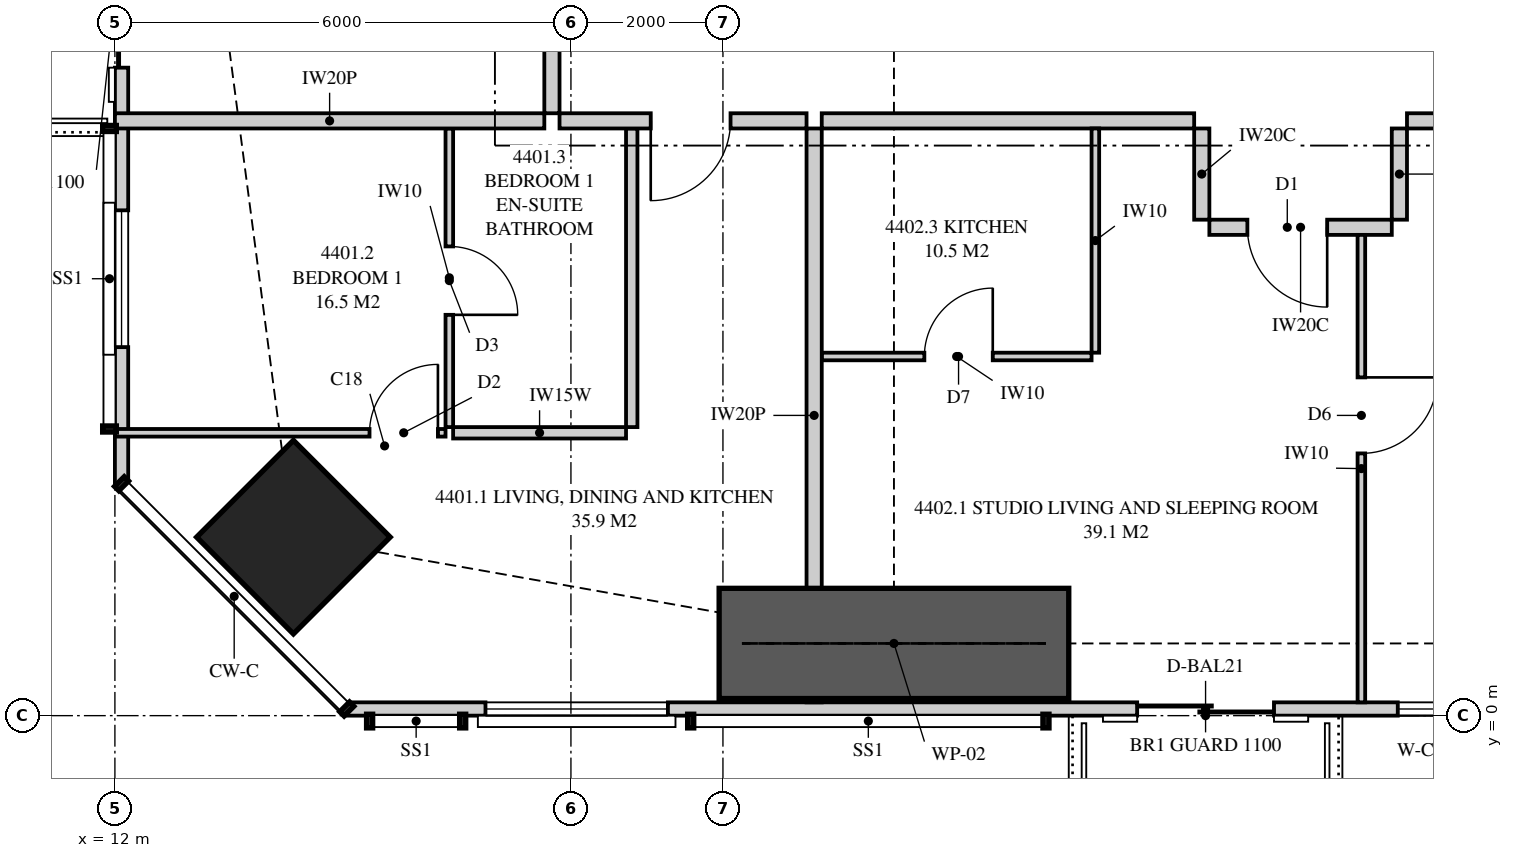
"""IFC4 building model, lengths in metres.
Left out: names, types, materials, properties, quantities, classifications, styles, units other than length and angle.
Written with IfcOpenShell. Run it as: python <this file> out.ifc"""

import sys

from ifc_helpers import new_model, si_unit, direction, frame, frame_2d, origin, origin_2d, place, context, subcontext, project, spatial, polyline, rectangle, outline, extrude, element, fill, save


model = new_model("IFC4")
c1 = context("Model", 3, precision=1e-05, world=origin(), true_north=direction((0.0, 1.0)))
c2 = subcontext(c1, "Body", "Model", "MODEL_VIEW")
j1 = project(units=[si_unit("LENGTHUNIT", "METRE"), si_unit("PLANEANGLEUNIT", "RADIAN")], contexts=[c1])
p1 = place(None, origin())
s1 = spatial("IfcSite", under=j1, at=p1, CompositionType="ELEMENT")
p2 = place(p1, origin())
s2 = spatial("IfcBuilding", under=s1, at=p2, CompositionType="ELEMENT")
p3 = place(p2, frame((0.0, 0.0, 164.4)))
s3 = spatial("IfcBuildingStorey", under=s2, at=p3, CompositionType="ELEMENT", Elevation=164.4)
p4 = place(p3, frame((14.348, 2.348, 0.0), z_axis=(0.0, 0.0, 1.0), x_axis=(0.707106781187, 0.707106781187, 0.0)))
e1 = element("IfcColumn", 1, at=p4, inside=s3, PredefinedType="COLUMN", context=c2, shape_type="SweptSolid", body=[
    extrude(rectangle(XDim=1.8, YDim=1.8, at=origin_2d()), origin(), (0.0, 0.0, 1.0), 3.35),
])
p5 = place(p3, frame((15.051, 0.087, 0.0), z_axis=(0.0, 0.0, 1.0), x_axis=(1.0, 0.0, 0.0)))
e2 = element("IfcWall", 2, at=p5, inside=s3, PredefinedType="SOLIDWALL", context=c2, shape_type="SweptSolid", body=[
    extrude(outline(polyline([(0.0, 0.0), (34.897, 0.0), (34.897, 3.11), (27.91, 3.11), (27.91, 2.15), (27.836, 2.15), (27.836, 3.11), (27.699, 3.11), (27.699, 2.15), (7.199, 2.15), (7.199, 3.11), (7.062, 3.11), (7.062, 2.15), (6.987, 2.15), (6.987, 3.11), (0.0, 3.11), (0.0, 0.0)])), frame((0.0, 0.087, 0.0), z_axis=(0.0, -1.0, 0.0), x_axis=(1.0, 0.0, 0.0)), (0.0, 0.0, 1.0), 0.175),
])
p6 = place(p5, frame((1.824, 0.0, 0.4)))
e3 = element("IfcOpeningElement", 3, at=p6, cuts=e2, PredefinedType="OPENING", context=c2, shape_type="SweptSolid", body=[
    extrude(rectangle(XDim=2.4, YDim=1.7, at=frame_2d((1.2, 0.85))), frame((0.0, 0.097, 0.0), z_axis=(0.0, -1.0, 0.0), x_axis=(1.0, 0.0, 0.0)), (0.0, 0.0, 1.0), 0.195),
])
p7 = place(p5, frame((10.399, 0.0, 0.0)))
e4 = element("IfcOpeningElement", 4, at=p7, cuts=e2, PredefinedType="OPENING", context=c2, shape_type="SweptSolid", body=[
    extrude(rectangle(XDim=1.8, YDim=2.1, at=frame_2d((0.9, 1.05))), frame((0.0, 0.097, 0.0), z_axis=(0.0, -1.0, 0.0), x_axis=(1.0, 0.0, 0.0)), (0.0, 0.0, 1.0), 0.195),
])
p8 = place(p5, frame((13.827, 0.0, 0.4)))
e5 = element("IfcOpeningElement", 5, at=p8, cuts=e2, PredefinedType="OPENING", context=c2, shape_type="SweptSolid", body=[
    extrude(rectangle(XDim=1.2, YDim=1.7, at=frame_2d((0.6, 0.85))), frame((0.0, 0.097, 0.0), z_axis=(0.0, -1.0, 0.0), x_axis=(1.0, 0.0, 0.0)), (0.0, 0.0, 1.0), 0.195),
])
p9 = place(p5, frame((22.799, 0.0, 0.0)))
e6 = element("IfcOpeningElement", 6, at=p9, cuts=e2, PredefinedType="OPENING", context=c2, shape_type="SweptSolid", body=[
    extrude(rectangle(XDim=1.8, YDim=2.1, at=frame_2d((0.9, 1.05))), frame((0.0, 0.097, 0.0), z_axis=(0.0, -1.0, 0.0), x_axis=(1.0, 0.0, 0.0)), (0.0, 0.0, 1.0), 0.195),
])
p10 = place(p5, frame((19.849, 0.0, 0.4)))
e7 = element("IfcOpeningElement", 7, at=p10, cuts=e2, PredefinedType="OPENING", context=c2, shape_type="SweptSolid", body=[
    extrude(rectangle(XDim=2.4, YDim=1.7, at=frame_2d((1.2, 0.85))), frame((0.0, 0.097, 0.0), z_axis=(0.0, -1.0, 0.0), x_axis=(1.0, 0.0, 0.0)), (0.0, 0.0, 1.0), 0.195),
])
p11 = place(p5, frame((30.108, 0.0, 0.4)))
e8 = element("IfcOpeningElement", 8, at=p11, cuts=e2, PredefinedType="OPENING", context=c2, shape_type="SweptSolid", body=[
    extrude(rectangle(XDim=2.4, YDim=1.7, at=frame_2d((1.2, 0.85))), frame((0.0, 0.097, 0.0), z_axis=(0.0, -1.0, 0.0), x_axis=(1.0, 0.0, 0.0)), (0.0, 0.0, 1.0), 0.195),
])
p12 = place(p3, frame((12.087, 32.949, 0.0), z_axis=(0.0, 0.0, 1.0), x_axis=(0.0, -1.0, 0.0)))
e9 = element("IfcWall", 9, at=p12, inside=s3, PredefinedType="SOLIDWALL", context=c2, shape_type="SweptSolid", body=[
    extrude(outline(polyline([(0.0, 0.0), (29.897, 0.0), (29.897, 3.11), (20.191, 3.11), (20.191, 2.15), (20.051, 2.15), (20.051, 3.11), (19.949, 3.11), (19.949, 2.15), (7.949, 2.15), (7.949, 3.11), (7.823, 3.11), (7.823, 2.15), (7.73, 2.15), (7.73, 3.11), (0.0, 3.11), (0.0, 0.0)])), frame((0.0, 0.087, 0.0), z_axis=(0.0, -1.0, 0.0), x_axis=(1.0, 0.0, 0.0)), (0.0, 0.0, 1.0), 0.175),
])
p13 = place(p12, frame((1.297, 0.0, 0.4)))
e10 = element("IfcOpeningElement", 10, at=p13, cuts=e9, PredefinedType="OPENING", context=c2, shape_type="SweptSolid", body=[
    extrude(rectangle(XDim=1.8, YDim=1.7, at=frame_2d((0.9, 0.85))), frame((0.0, 0.097, 0.0), z_axis=(0.0, -1.0, 0.0), x_axis=(1.0, 0.0, 0.0)), (0.0, 0.0, 1.0), 0.195),
])
p14 = place(p12, frame((4.349, 0.0, 0.4)))
e11 = element("IfcOpeningElement", 11, at=p14, cuts=e9, PredefinedType="OPENING", context=c2, shape_type="SweptSolid", body=[
    extrude(rectangle(XDim=1.2, YDim=1.7, at=frame_2d((0.6, 0.85))), frame((0.0, 0.097, 0.0), z_axis=(0.0, -1.0, 0.0), x_axis=(1.0, 0.0, 0.0)), (0.0, 0.0, 1.0), 0.195),
])
p15 = place(p12, frame((11.024, 0.0, 0.4)))
e12 = element("IfcOpeningElement", 12, at=p15, cuts=e9, PredefinedType="OPENING", context=c2, shape_type="SweptSolid", body=[
    extrude(rectangle(XDim=1.8, YDim=1.7, at=frame_2d((0.9, 0.85))), frame((0.0, 0.097, 0.0), z_axis=(0.0, -1.0, 0.0), x_axis=(1.0, 0.0, 0.0)), (0.0, 0.0, 1.0), 0.195),
])
p16 = place(p12, frame((15.044, 0.0, 0.4)))
e13 = element("IfcOpeningElement", 13, at=p16, cuts=e9, PredefinedType="OPENING", context=c2, shape_type="SweptSolid", body=[
    extrude(rectangle(XDim=2.4, YDim=1.7, at=frame_2d((1.2, 0.85))), frame((0.0, 0.097, 0.0), z_axis=(0.0, -1.0, 0.0), x_axis=(1.0, 0.0, 0.0)), (0.0, 0.0, 1.0), 0.195),
])
p17 = place(p12, frame((22.624, 0.0, 0.0)))
e14 = element("IfcOpeningElement", 14, at=p17, cuts=e9, PredefinedType="OPENING", context=c2, shape_type="SweptSolid", body=[
    extrude(rectangle(XDim=1.8, YDim=2.1, at=frame_2d((0.9, 1.05))), frame((0.0, 0.097, 0.0), z_axis=(0.0, -1.0, 0.0), x_axis=(1.0, 0.0, 0.0)), (0.0, 0.0, 1.0), 0.195),
])
p18 = place(p12, frame((26.301, 0.0, 0.4)))
e15 = element("IfcOpeningElement", 15, at=p18, cuts=e9, PredefinedType="OPENING", context=c2, shape_type="SweptSolid", body=[
    extrude(rectangle(XDim=1.8, YDim=1.7, at=frame_2d((0.9, 0.85))), frame((0.0, 0.097, 0.0), z_axis=(0.0, -1.0, 0.0), x_axis=(1.0, 0.0, 0.0)), (0.0, 0.0, 1.0), 0.195),
])
p19 = place(p3, frame((21.2, 0.175, 0.0), z_axis=(0.0, 0.0, 1.0), x_axis=(0.0, 1.0, 0.0)))
e16 = element("IfcWall", 16, at=p19, inside=s3, PredefinedType="PARTITIONING", context=c2, shape_type="SweptSolid", body=[
    extrude(outline(polyline([(0.037, 3.11), (0.0, 3.11), (0.0, 0.0), (0.529, 0.0), (0.529, 0.667), (1.021, 0.667), (1.021, 0.0), (7.55, 0.0), (7.55, 3.11), (1.885, 3.11), (1.885, 2.15), (1.021, 2.15), (1.021, 1.483), (0.529, 1.483), (0.529, 2.15), (0.037, 2.15), (0.037, 3.11)])), frame((0.0, 0.1, 0.0), z_axis=(0.0, -1.0, 0.0), x_axis=(1.0, 0.0, 0.0)), (0.0, 0.0, 1.0), 0.2),
])
p20 = place(p3, frame((17.85, 7.825, 0.0), z_axis=(0.0, 0.0, 1.0), x_axis=(1.0, 0.0, 0.0)))
e17 = element("IfcWall", 17, at=p20, inside=s3, PredefinedType="PARTITIONING", context=c2, shape_type="SweptSolid", body=[
    extrude(rectangle(XDim=3.25, YDim=0.2, at=frame_2d((1.625, 0.0))), origin(), (0.0, 0.0, 1.0), 3.11),
])
p21 = place(p20, frame((1.2, 0.0, 0.0)))
e18 = element("IfcOpeningElement", 18, at=p21, cuts=e17, PredefinedType="OPENING", context=c2, shape_type="SweptSolid", body=[
    extrude(rectangle(XDim=1.05, YDim=2.2, at=frame_2d((0.525, 1.1))), frame((0.0, 0.11, 0.0), z_axis=(0.0, -1.0, 0.0), x_axis=(1.0, 0.0, 0.0)), (0.0, 0.0, 1.0), 0.22),
])
p22 = place(p3, frame((16.4, 3.796, 0.0), z_axis=(0.0, 0.0, 1.0), x_axis=(0.0, 1.0, 0.0)))
e19 = element("IfcWall", 19, at=p22, inside=s3, PredefinedType="PARTITIONING", context=c2, shape_type="SweptSolid", body=[
    extrude(rectangle(XDim=3.929, YDim=0.1, at=frame_2d((1.964, 0.0))), origin(), (0.0, 0.0, 1.0), 3.11),
])
p23 = place(p22, frame((1.477, 0.0, 0.0)))
e20 = element("IfcOpeningElement", 20, at=p23, cuts=e19, PredefinedType="OPENING", context=c2, shape_type="SweptSolid", body=[
    extrude(rectangle(XDim=0.9, YDim=2.1, at=frame_2d((0.45, 1.05))), frame((0.0, 0.06, 0.0), z_axis=(0.0, -1.0, 0.0), x_axis=(1.0, 0.0, 0.0)), (0.0, 0.0, 1.0), 0.12),
])
p24 = place(p3, frame((16.35, 3.721, 0.0), z_axis=(0.0, 0.0, 1.0), x_axis=(-1.0, 0.0, 0.0)))
e21 = element("IfcWall", 21, at=p24, inside=s3, PredefinedType="PARTITIONING", context=c2, shape_type="SweptSolid", body=[
    extrude(outline(polyline([(0.0, 0.0), (4.35, 0.0), (4.35, 3.11), (3.049, 3.11), (3.049, 2.15), (1.314, 2.15), (1.314, 3.11), (0.0, 3.11), (0.0, 0.0)])), frame((0.0, 0.05, 0.0), z_axis=(0.0, -1.0, 0.0), x_axis=(1.0, 0.0, 0.0)), (0.0, 0.0, 1.0), 0.1),
])
p25 = place(p24, frame((0.1, 0.0, 0.0)))
e22 = element("IfcOpeningElement", 22, at=p25, cuts=e21, PredefinedType="OPENING", context=c2, shape_type="SweptSolid", body=[
    extrude(rectangle(XDim=0.9, YDim=2.1, at=frame_2d((0.45, 1.05))), frame((0.0, 0.06, 0.0), z_axis=(0.0, -1.0, 0.0), x_axis=(1.0, 0.0, 0.0)), (0.0, 0.0, 1.0), 0.12),
])
p26 = place(p3, frame((18.725, 3.721, 0.0), z_axis=(0.0, 0.0, 1.0), x_axis=(-1.0, 0.0, 0.0)))
e23 = element("IfcWall", 23, at=p26, inside=s3, PredefinedType="PLUMBINGWALL", context=c2, shape_type="SweptSolid", body=[
    extrude(rectangle(XDim=2.275, YDim=0.15, at=frame_2d((1.138, 0.0))), origin(), (0.0, 0.0, 1.0), 3.11),
])
p27 = place(p3, frame((18.8, 3.796, 0.0), z_axis=(0.0, 0.0, 1.0), x_axis=(0.0, 1.0, 0.0)))
e24 = element("IfcWall", 24, at=p27, inside=s3, PredefinedType="PLUMBINGWALL", context=c2, shape_type="SweptSolid", body=[
    extrude(rectangle(XDim=3.929, YDim=0.15, at=frame_2d((1.964, 0.0))), origin(), (0.0, 0.0, 1.0), 3.11),
])
p28 = place(p3, frame((21.3, 7.825, 0.0), z_axis=(0.0, 0.0, 1.0), x_axis=(1.0, 0.0, 0.0)))
e25 = element("IfcWall", 25, at=p28, inside=s3, PredefinedType="PARTITIONING", context=c2, shape_type="SweptSolid", body=[
    extrude(outline(polyline([(0.0, 0.0), (4.9, 0.0), (4.9, 3.11), (1.287, 3.11), (1.287, 2.541), (0.613, 2.541), (0.613, 3.11), (0.0, 3.11), (0.0, 0.0)])), frame((0.0, 0.1, 0.0), z_axis=(0.0, -1.0, 0.0), x_axis=(1.0, 0.0, 0.0)), (0.0, 0.0, 1.0), 0.2),
])
p29 = place(p3, frame((21.3, 4.725, 0.0), z_axis=(0.0, 0.0, 1.0), x_axis=(1.0, 0.0, 0.0)))
e26 = element("IfcWall", 26, at=p29, inside=s3, PredefinedType="PARTITIONING", context=c2, shape_type="SweptSolid", body=[
    extrude(outline(polyline([(0.0, 0.0), (3.55, 0.0), (3.55, 3.11), (1.237, 3.11), (1.237, 2.541), (0.663, 2.541), (0.663, 3.11), (0.0, 3.11), (0.0, 0.0)])), frame((0.0, 0.05, 0.0), z_axis=(0.0, -1.0, 0.0), x_axis=(1.0, 0.0, 0.0)), (0.0, 0.0, 1.0), 0.1),
])
p30 = place(p29, frame((1.35, 0.0, 0.0)))
e27 = element("IfcOpeningElement", 27, at=p30, cuts=e26, PredefinedType="OPENING", context=c2, shape_type="SweptSolid", body=[
    extrude(rectangle(XDim=0.9, YDim=2.1, at=frame_2d((0.45, 1.05))), frame((0.0, 0.06, 0.0), z_axis=(0.0, -1.0, 0.0), x_axis=(1.0, 0.0, 0.0)), (0.0, 0.0, 1.0), 0.12),
])
p31 = place(p3, frame((24.9, 4.775, 0.0), z_axis=(0.0, 0.0, 1.0), x_axis=(0.0, 1.0, 0.0)))
e28 = element("IfcWall", 28, at=p31, inside=s3, PredefinedType="PARTITIONING", context=c2, shape_type="SweptSolid", body=[
    extrude(rectangle(XDim=2.95, YDim=0.1, at=frame_2d((1.475, 0.0))), origin(), (0.0, 0.0, 1.0), 3.11),
])
p32 = place(p3, frame((28.4, 0.175, 0.0), z_axis=(0.0, 0.0, 1.0), x_axis=(0.0, 1.0, 0.0)))
e29 = element("IfcWall", 29, at=p32, inside=s3, PredefinedType="PARTITIONING", context=c2, shape_type="SweptSolid", body=[
    extrude(outline(polyline([(0.0, 0.0), (6.15, 0.0), (6.15, 3.11), (1.635, 3.11), (1.635, 2.15), (0.0, 2.15), (0.0, 3.11), (0.0, 0.0)])), frame((0.0, 0.05, 0.0), z_axis=(0.0, -1.0, 0.0), x_axis=(1.0, 0.0, 0.0)), (0.0, 0.0, 1.0), 0.1),
])
p33 = place(p32, frame((3.275, 0.0, 0.0)))
e30 = element("IfcOpeningElement", 30, at=p33, cuts=e29, PredefinedType="OPENING", context=c2, shape_type="SweptSolid", body=[
    extrude(rectangle(XDim=1.0, YDim=2.1, at=frame_2d((0.5, 1.05))), frame((0.0, 0.06, 0.0), z_axis=(0.0, -1.0, 0.0), x_axis=(1.0, 0.0, 0.0)), (0.0, 0.0, 1.0), 0.12),
])
p34 = place(p3, frame((12.0, 7.825, 0.0), z_axis=(0.0, 0.0, 1.0), x_axis=(1.0, 0.0, 0.0)))
e31 = element("IfcWall", 31, at=p34, inside=s3, PredefinedType="PARTITIONING", context=c2, shape_type="SweptSolid", body=[
    extrude(outline(polyline([(0.0, 0.0), (5.65, 0.0), (5.65, 3.11), (2.547, 3.11), (2.547, 2.15), (0.712, 2.15), (0.712, 3.11), (0.0, 3.11), (0.0, 0.0)])), frame((0.0, 0.1, 0.0), z_axis=(0.0, -1.0, 0.0), x_axis=(1.0, 0.0, 0.0)), (0.0, 0.0, 1.0), 0.2),
])
p35 = place(p3, frame((17.75, 7.925, 0.0), z_axis=(0.0, 0.0, 1.0), x_axis=(0.0, 1.0, 0.0)))
e32 = element("IfcWall", 32, at=p35, inside=s3, PredefinedType="PARTITIONING", context=c2, shape_type="SweptSolid", body=[
    extrude(outline(polyline([(0.0, 0.0), (14.875, 0.0), (14.875, 3.11), (5.412, 3.11), (5.412, 2.541), (4.738, 2.541), (4.738, 3.11), (0.0, 3.11), (0.0, 0.0)])), frame((0.0, 0.1, 0.0), z_axis=(0.0, -1.0, 0.0), x_axis=(1.0, 0.0, 0.0)), (0.0, 0.0, 1.0), 0.2),
])
p36 = place(p35, frame((6.938, 0.0, 0.0)))
e33 = element("IfcOpeningElement", 33, at=p36, cuts=e32, PredefinedType="OPENING", context=c2, shape_type="SweptSolid", body=[
    extrude(rectangle(XDim=1.05, YDim=2.2, at=frame_2d((0.525, 1.1))), frame((0.0, 0.11, 0.0), z_axis=(0.0, -1.0, 0.0), x_axis=(1.0, 0.0, 0.0)), (0.0, 0.0, 1.0), 0.22),
])
p37 = place(p3, frame((29.0, 7.825, 0.0), z_axis=(0.0, 0.0, 1.0), x_axis=(1.0, 0.0, 0.0)))
e34 = element("IfcWall", 34, at=p37, inside=s3, PredefinedType="PARTITIONING", context=c2, shape_type="SweptSolid", body=[
    extrude(outline(polyline([(0.0, 0.0), (4.5, 0.0), (4.5, 3.11), (3.837, 3.11), (3.837, 2.541), (3.163, 2.541), (3.163, 3.11), (0.0, 3.11), (0.0, 0.0)])), frame((0.0, 0.1, 0.0), z_axis=(0.0, -1.0, 0.0), x_axis=(1.0, 0.0, 0.0)), (0.0, 0.0, 1.0), 0.2),
])
p38 = place(p3, frame((26.4, 6.425, 0.0), z_axis=(0.0, 0.0, 1.0), x_axis=(1.0, 0.0, 0.0)))
e35 = element("IfcWall", 35, at=p38, inside=s3, PredefinedType="PARTITIONING", context=c2, shape_type="SweptSolid", body=[
    extrude(rectangle(XDim=2.4, YDim=0.2, at=frame_2d((1.2, 0.0))), origin(), (0.0, 0.0, 1.0), 3.11),
])
p39 = place(p38, frame((0.5, 0.0, 0.0)))
e36 = element("IfcOpeningElement", 36, at=p39, cuts=e35, PredefinedType="OPENING", context=c2, shape_type="SweptSolid", body=[
    extrude(rectangle(XDim=1.05, YDim=2.2, at=frame_2d((0.525, 1.1))), frame((0.0, 0.11, 0.0), z_axis=(0.0, -1.0, 0.0), x_axis=(1.0, 0.0, 0.0)), (0.0, 0.0, 1.0), 0.22),
])
for number, where, z_axis, x_axis in (
    (37, (26.3, 7.725, 0.0), (0.0, 0.0, 1.0), (0.0, -1.0, 0.0)),
    (38, (28.9, 7.725, 0.0), (0.0, 0.0, 1.0), (0.0, -1.0, 0.0)),
):
    element("IfcWall", number, at=place(p3, frame(where, z_axis=z_axis, x_axis=x_axis)), inside=s3, PredefinedType="PARTITIONING", context=c2, shape_type="SweptSolid", body=[
        extrude(rectangle(XDim=1.2, YDim=0.2, at=frame_2d((0.6, 0.0))), origin(), (0.0, 0.0, 1.0), 3.11),
    ])
p40 = place(p3, frame((19.95, 0.95, 0.0), z_axis=(0.0, 0.0, 1.0), x_axis=(1.0, 0.0, 0.0)))
e39 = element("IfcWall", 39, at=p40, inside=s3, PredefinedType="SHEAR", context=c2, shape_type="SweptSolid", body=[
    extrude(rectangle(XDim=4.6, YDim=1.45, at=frame_2d((2.3, 0.0))), origin(), (0.0, 0.0, 1.0), 3.35),
])
p41 = place(p6, origin())
e40 = element("IfcWindow", 40, at=p41, inside=s3, PartitioningType="SINGLE_PANEL", PredefinedType="WINDOW", context=c2, shape_type="SweptSolid", body=[
    extrude(rectangle(XDim=2.4, YDim=1.7, at=frame_2d((1.2, 0.85))), frame((0.0, 0.03, 0.0), z_axis=(0.0, -1.0, 0.0), x_axis=(1.0, 0.0, 0.0)), (0.0, 0.0, 1.0), 0.06),
])
fill(e3, e40)
p42 = place(p7, origin())
e41 = element("IfcDoor", 41, at=p42, inside=s3, OperationType="SLIDING_TO_LEFT", PredefinedType="DOOR", context=c2, shape_type="SweptSolid", body=[
    extrude(rectangle(XDim=1.8, YDim=2.1, at=frame_2d((0.9, 1.05))), frame((0.0, 0.025, 0.0), z_axis=(0.0, -1.0, 0.0), x_axis=(1.0, 0.0, 0.0)), (0.0, 0.0, 1.0), 0.05),
])
fill(e4, e41)
p43 = place(p8, origin())
e42 = element("IfcWindow", 42, at=p43, inside=s3, PartitioningType="SINGLE_PANEL", PredefinedType="WINDOW", context=c2, shape_type="SweptSolid", body=[
    extrude(rectangle(XDim=1.2, YDim=1.7, at=frame_2d((0.6, 0.85))), frame((0.0, 0.03, 0.0), z_axis=(0.0, -1.0, 0.0), x_axis=(1.0, 0.0, 0.0)), (0.0, 0.0, 1.0), 0.06),
])
fill(e5, e42)
p44 = place(p17, origin())
e43 = element("IfcDoor", 43, at=p44, inside=s3, OperationType="SLIDING_TO_LEFT", PredefinedType="DOOR", context=c2, shape_type="SweptSolid", body=[
    extrude(rectangle(XDim=1.8, YDim=2.1, at=frame_2d((0.9, 1.05))), frame((0.0, 0.025, 0.0), z_axis=(0.0, -1.0, 0.0), x_axis=(1.0, 0.0, 0.0)), (0.0, 0.0, 1.0), 0.05),
])
fill(e14, e43)
p45 = place(p18, origin())
e44 = element("IfcWindow", 44, at=p45, inside=s3, PartitioningType="SINGLE_PANEL", PredefinedType="WINDOW", context=c2, shape_type="SweptSolid", body=[
    extrude(rectangle(XDim=1.8, YDim=1.7, at=frame_2d((0.9, 0.85))), frame((0.0, 0.03, 0.0), z_axis=(0.0, -1.0, 0.0), x_axis=(1.0, 0.0, 0.0)), (0.0, 0.0, 1.0), 0.06),
])
fill(e15, e44)
p46 = place(p21, frame((1.05, 0.0, 0.0), z_axis=(0.0, 0.0, 1.0), x_axis=(-1.0, 0.0, 0.0)))
e45 = element("IfcDoor", 45, at=p46, inside=s3, OperationType="SINGLE_SWING_RIGHT", PredefinedType="DOOR", context=c2, shape_type="SweptSolid", body=[
    extrude(rectangle(XDim=1.05, YDim=2.2, at=frame_2d((0.525, 1.1))), frame((0.0, 0.025, 0.0), z_axis=(0.0, -1.0, 0.0), x_axis=(1.0, 0.0, 0.0)), (0.0, 0.0, 1.0), 0.05),
])
fill(e18, e45)
p47 = place(p25, frame((0.9, 0.0, 0.0), z_axis=(0.0, 0.0, 1.0), x_axis=(-1.0, 0.0, 0.0)))
e46 = element("IfcDoor", 46, at=p47, inside=s3, OperationType="SINGLE_SWING_RIGHT", PredefinedType="DOOR", context=c2, shape_type="SweptSolid", body=[
    extrude(rectangle(XDim=0.9, YDim=2.1, at=frame_2d((0.45, 1.05))), frame((0.0, 0.025, 0.0), z_axis=(0.0, -1.0, 0.0), x_axis=(1.0, 0.0, 0.0)), (0.0, 0.0, 1.0), 0.05),
])
fill(e22, e46)
p48 = place(p23, frame((0.9, 0.0, 0.0), z_axis=(0.0, 0.0, 1.0), x_axis=(-1.0, 0.0, 0.0)))
e47 = element("IfcDoor", 47, at=p48, inside=s3, OperationType="SINGLE_SWING_RIGHT", PredefinedType="DOOR", context=c2, shape_type="SweptSolid", body=[
    extrude(rectangle(XDim=0.9, YDim=2.1, at=frame_2d((0.45, 1.05))), frame((0.0, 0.025, 0.0), z_axis=(0.0, -1.0, 0.0), x_axis=(1.0, 0.0, 0.0)), (0.0, 0.0, 1.0), 0.05),
])
fill(e20, e47)
p49 = place(p39, frame((1.05, 0.0, 0.0), z_axis=(0.0, 0.0, 1.0), x_axis=(-1.0, 0.0, 0.0)))
e48 = element("IfcDoor", 48, at=p49, inside=s3, OperationType="SINGLE_SWING_LEFT", PredefinedType="DOOR", context=c2, shape_type="SweptSolid", body=[
    extrude(rectangle(XDim=1.05, YDim=2.2, at=frame_2d((0.525, 1.1))), frame((0.0, 0.025, 0.0), z_axis=(0.0, -1.0, 0.0), x_axis=(1.0, 0.0, 0.0)), (0.0, 0.0, 1.0), 0.05),
])
fill(e36, e48)
p50 = place(p30, origin())
e49 = element("IfcDoor", 49, at=p50, inside=s3, OperationType="SINGLE_SWING_RIGHT", PredefinedType="DOOR", context=c2, shape_type="SweptSolid", body=[
    extrude(rectangle(XDim=0.9, YDim=2.1, at=frame_2d((0.45, 1.05))), frame((0.0, 0.025, 0.0), z_axis=(0.0, -1.0, 0.0), x_axis=(1.0, 0.0, 0.0)), (0.0, 0.0, 1.0), 0.05),
])
fill(e27, e49)
p51 = place(p33, frame((1.0, 0.0, 0.0), z_axis=(0.0, 0.0, 1.0), x_axis=(-1.0, 0.0, 0.0)))
e50 = element("IfcDoor", 50, at=p51, inside=s3, OperationType="SINGLE_SWING_LEFT", PredefinedType="DOOR", context=c2, shape_type="SweptSolid", body=[
    extrude(rectangle(XDim=1.0, YDim=2.1, at=frame_2d((0.5, 1.05))), frame((0.0, 0.025, 0.0), z_axis=(0.0, -1.0, 0.0), x_axis=(1.0, 0.0, 0.0)), (0.0, 0.0, 1.0), 0.05),
])
fill(e30, e50)
save(model, sys.argv[1])
